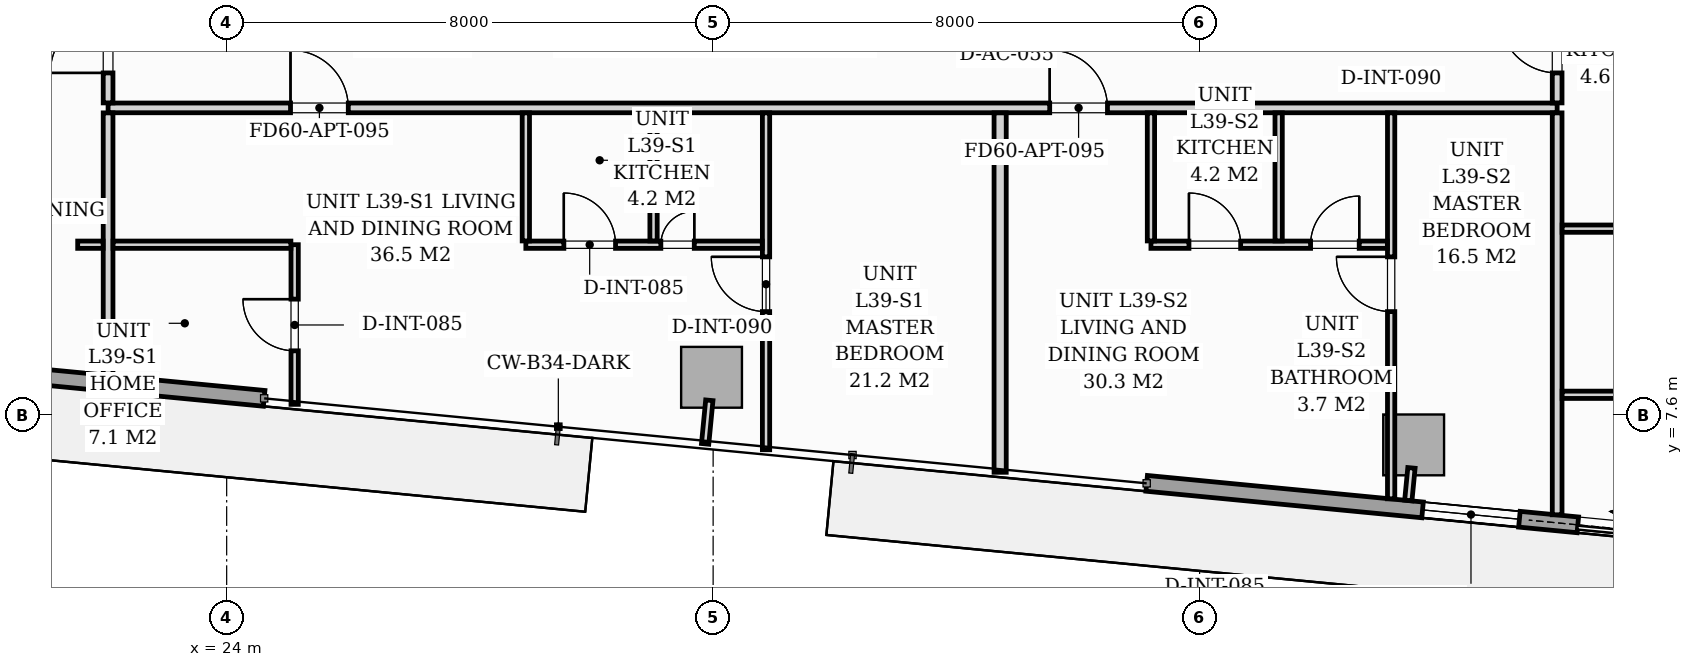
"""IFC4 building model, lengths in metres.
Left out: names, types, materials, properties, quantities, classifications, styles, units other than length and angle.
Written with IfcOpenShell. Run it as: python <this file> out.ifc"""

import sys

from ifc_helpers import new_model, si_unit, direction, frame, frame_2d, origin, origin_2d, place, context, subcontext, project, spatial, rectangle, extrude, source, transform, mapped, element, fill, save


model = new_model("IFC4")
c1 = context("Model", 3, precision=1e-05, world=origin(), true_north=direction((0.0, 1.0)))
c2 = subcontext(c1, "Body", "Model", "MODEL_VIEW")
j1 = project(units=[si_unit("LENGTHUNIT", "METRE"), si_unit("PLANEANGLEUNIT", "RADIAN")], contexts=[c1])
p1 = place(None, origin())
s1 = spatial("IfcSite", under=j1, at=p1, CompositionType="ELEMENT")
p2 = place(p1, origin())
s2 = spatial("IfcBuilding", under=s1, at=p2, CompositionType="ELEMENT")
p3 = place(p2, frame((0.0, 0.0, 137.4)))
s3 = spatial("IfcBuildingStorey", under=s2, at=p3, CompositionType="ELEMENT", Elevation=137.4)
m1 = source(origin(), c2, "Body", "SweptSolid", [
    extrude(rectangle(XDim=1.0, YDim=1.0, at=origin_2d()), origin(), (0.0, 0.0, 1.0), 3.196),
])
for number, where, z_axis, x_axis in (
    (1, (31.974, 8.22, 0.002), (0.0, 0.0, 1.0), (0.995, -0.096, 0.0)),
    (2, (43.521, 7.108, 0.002), (0.0, 0.0, 1.0), (0.995, -0.096, 0.0)),
):
    element("IfcColumn", number, at=place(p3, frame(where, z_axis=z_axis, x_axis=x_axis)), inside=s3, PredefinedType="COLUMN", context=c2, shape_type="MappedRepresentation", body=[
        mapped(m1, transform((0.0, 0.0, 0.0), scale=1.0)),
    ])
p4 = place(p3, frame((56.061, 4.845, 0.0), z_axis=(0.0, 0.0, 1.0), x_axis=(-0.995395976631, 0.095848055311, 0.0)))
e3 = element("IfcWall", 3, at=p4, inside=s3, PredefinedType="STANDARD", context=c2, shape_type="SweptSolid", body=[
    extrude(rectangle(XDim=17.01, YDim=0.26, at=frame_2d((8.505, 0.0))), origin(), (0.0, 0.0, 1.0), 2.94),
])
p5 = place(p4, frame((8.087, 0.0, 0.0)))
e4 = element("IfcOpeningElement", 4, at=p5, cuts=e3, PredefinedType="OPENING", context=c2, shape_type="SweptSolid", body=[
    extrude(rectangle(XDim=1.8, YDim=2.06, at=frame_2d((0.9, 1.03))), frame((0.0, 0.14, 0.0), z_axis=(0.0, -1.0, 0.0), x_axis=(1.0, 0.0, 0.0)), (0.0, 0.0, 1.0), 0.28),
])
p6 = place(p4, frame((2.05, 0.0, 0.65)))
e5 = element("IfcOpeningElement", 5, at=p6, cuts=e3, PredefinedType="OPENING", context=c2, shape_type="SweptSolid", body=[
    extrude(rectangle(XDim=1.6, YDim=1.5, at=frame_2d((0.8, 0.75))), frame((0.0, 0.14, 0.0), z_axis=(0.0, -1.0, 0.0), x_axis=(1.0, 0.0, 0.0)), (0.0, 0.0, 1.0), 0.28),
])
p7 = place(p4, frame((10.852, 0.0, 0.75)))
e6 = element("IfcOpeningElement", 6, at=p7, cuts=e3, PredefinedType="OPENING", context=c2, shape_type="SweptSolid", body=[
    extrude(rectangle(XDim=1.6, YDim=1.5, at=frame_2d((0.8, 0.75))), frame((0.0, 0.14, 0.0), z_axis=(0.0, -1.0, 0.0), x_axis=(1.0, 0.0, 0.0)), (0.0, 0.0, 1.0), 0.28),
])
p8 = place(p3, frame((24.617, 7.873, 0.0), z_axis=(0.0, 0.0, 1.0), x_axis=(-0.995395976631, 0.095848055311, 0.0)))
e7 = element("IfcWall", 7, at=p8, inside=s3, PredefinedType="STANDARD", context=c2, shape_type="SweptSolid", body=[
    extrude(rectangle(XDim=17.01, YDim=0.26, at=frame_2d((8.505, 0.0))), origin(), (0.0, 0.0, 1.0), 2.94),
])
p9 = place(p8, frame((7.35, 0.0, 0.0)))
e8 = element("IfcOpeningElement", 8, at=p9, cuts=e7, PredefinedType="OPENING", context=c2, shape_type="SweptSolid", body=[
    extrude(rectangle(XDim=1.8, YDim=2.06, at=frame_2d((0.9, 1.03))), frame((0.0, 0.14, 0.0), z_axis=(0.0, -1.0, 0.0), x_axis=(1.0, 0.0, 0.0)), (0.0, 0.0, 1.0), 0.28),
])
p10 = place(p8, frame((9.7, 0.0, 0.65)))
e9 = element("IfcOpeningElement", 9, at=p10, cuts=e7, PredefinedType="OPENING", context=c2, shape_type="SweptSolid", body=[
    extrude(rectangle(XDim=1.6, YDim=1.5, at=frame_2d((0.8, 0.75))), frame((0.0, 0.14, 0.0), z_axis=(0.0, -1.0, 0.0), x_axis=(1.0, 0.0, 0.0)), (0.0, 0.0, 1.0), 0.28),
])
p11 = place(p3, frame((22.05, 12.65, 0.0), z_axis=(0.0, 0.0, 1.0), x_axis=(1.0, 0.0, 0.0)))
e10 = element("IfcWall", 10, at=p11, inside=s3, PredefinedType="PARTITIONING", context=c2, shape_type="SweptSolid", body=[
    extrude(rectangle(XDim=23.83, YDim=0.16, at=frame_2d((11.915, 0.0))), origin(), (0.0, 0.0, 1.0), 2.94),
])
p12 = place(p11, frame((3.0, 0.0, 0.0)))
e11 = element("IfcOpeningElement", 11, at=p12, cuts=e10, PredefinedType="OPENING", context=c2, shape_type="SweptSolid", body=[
    extrude(rectangle(XDim=0.95, YDim=2.06, at=frame_2d((0.475, 1.03))), frame((0.0, 0.09, 0.0), z_axis=(0.0, -1.0, 0.0), x_axis=(1.0, 0.0, 0.0)), (0.0, 0.0, 1.0), 0.18),
])
p13 = place(p11, frame((15.485, 0.0, 0.0)))
e12 = element("IfcOpeningElement", 12, at=p13, cuts=e10, PredefinedType="OPENING", context=c2, shape_type="SweptSolid", body=[
    extrude(rectangle(XDim=0.95, YDim=2.06, at=frame_2d((0.475, 1.03))), frame((0.0, 0.09, 0.0), z_axis=(0.0, -1.0, 0.0), x_axis=(1.0, 0.0, 0.0)), (0.0, 0.0, 1.0), 0.18),
])
p14 = place(p3, frame((22.05, 8.253, 0.0), z_axis=(0.0, 0.0, 1.0), x_axis=(0.0, 1.0, 0.0)))
e13 = element("IfcWall", 13, at=p14, inside=s3, PredefinedType="PARTITIONING", context=c2, shape_type="SweptSolid", body=[
    extrude(rectangle(XDim=4.315, YDim=0.16, at=frame_2d((2.157, 0.0))), origin(), (0.0, 0.0, 1.0), 2.94),
])
p15 = place(p3, frame((22.05, 12.732, 0.0), z_axis=(0.0, 0.0, 1.0), x_axis=(0.0, 1.0, 0.0)))
e14 = element("IfcWall", 14, at=p15, inside=s3, PredefinedType="PARTITIONING", context=c2, shape_type="SweptSolid", body=[
    extrude(rectangle(XDim=14.685, YDim=0.16, at=frame_2d((7.343, 0.0))), origin(), (0.0, 0.0, 1.0), 2.94),
])
p16 = place(p15, frame((0.493, 0.0, 0.0)))
e15 = element("IfcOpeningElement", 15, at=p16, cuts=e14, PredefinedType="OPENING", context=c2, shape_type="SweptSolid", body=[
    extrude(rectangle(XDim=0.95, YDim=2.06, at=frame_2d((0.475, 1.03))), frame((0.0, 0.09, 0.0), z_axis=(0.0, -1.0, 0.0), x_axis=(1.0, 0.0, 0.0)), (0.0, 0.0, 1.0), 0.18),
])
p17 = place(p15, frame((5.313, 0.0, 0.0)))
e16 = element("IfcOpeningElement", 16, at=p17, cuts=e14, PredefinedType="OPENING", context=c2, shape_type="SweptSolid", body=[
    extrude(rectangle(XDim=0.85, YDim=2.0, at=frame_2d((0.425, 1.0))), frame((0.0, 0.09, 0.0), z_axis=(0.0, -1.0, 0.0), x_axis=(1.0, 0.0, 0.0)), (0.0, 0.0, 1.0), 0.18),
])
p18 = place(p3, frame((45.88, 5.958, 0.0), z_axis=(0.0, 0.0, 1.0), x_axis=(0.0, 1.0, 0.0)))
e17 = element("IfcWall", 17, at=p18, inside=s3, PredefinedType="PARTITIONING", context=c2, shape_type="SweptSolid", body=[
    extrude(rectangle(XDim=6.61, YDim=0.16, at=frame_2d((3.305, 0.0))), origin(), (0.0, 0.0, 1.0), 2.94),
])
p19 = place(p3, frame((45.88, 12.732, 0.0), z_axis=(0.0, 0.0, 1.0), x_axis=(0.0, 1.0, 0.0)))
e18 = element("IfcWall", 18, at=p19, inside=s3, PredefinedType="PARTITIONING", context=c2, shape_type="SweptSolid", body=[
    extrude(rectangle(XDim=4.366, YDim=0.16, at=frame_2d((2.183, 0.0))), origin(), (0.0, 0.0, 1.0), 2.94),
])
p20 = place(p19, frame((0.493, 0.0, 0.0)))
e19 = element("IfcOpeningElement", 19, at=p20, cuts=e18, PredefinedType="OPENING", context=c2, shape_type="SweptSolid", body=[
    extrude(rectangle(XDim=0.95, YDim=2.06, at=frame_2d((0.475, 1.03))), frame((0.0, 0.09, 0.0), z_axis=(0.0, -1.0, 0.0), x_axis=(1.0, 0.0, 0.0)), (0.0, 0.0, 1.0), 0.18),
])
p21 = place(p3, frame((32.87, 7.028, 0.0), z_axis=(0.0, 0.0, 1.0), x_axis=(0.0, 1.0, 0.0)))
e20 = element("IfcWall", 20, at=p21, inside=s3, PredefinedType="PARTITIONING", context=c2, shape_type="SweptSolid", body=[
    extrude(rectangle(XDim=5.54, YDim=0.12, at=frame_2d((2.77, 0.0))), origin(), (0.0, 0.0, 1.0), 2.94),
])
p22 = place(p21, frame((2.272, 0.0, 0.0)))
e21 = element("IfcOpeningElement", 21, at=p22, cuts=e20, PredefinedType="OPENING", context=c2, shape_type="SweptSolid", body=[
    extrude(rectangle(XDim=0.9, YDim=2.05, at=frame_2d((0.45, 1.025))), frame((0.0, 0.07, 0.0), z_axis=(0.0, -1.0, 0.0), x_axis=(1.0, 0.0, 0.0)), (0.0, 0.0, 1.0), 0.14),
])
p23 = place(p3, frame((28.92, 10.4, 0.0), z_axis=(0.0, 0.0, 1.0), x_axis=(1.0, 0.0, 0.0)))
e22 = element("IfcWall", 22, at=p23, inside=s3, PredefinedType="PARTITIONING", context=c2, shape_type="SweptSolid", body=[
    extrude(rectangle(XDim=3.888, YDim=0.12, at=frame_2d((1.944, 0.0))), origin(), (0.0, 0.0, 1.0), 2.94),
])
p24 = place(p23, frame((0.625, 0.0, 0.0)))
e23 = element("IfcOpeningElement", 23, at=p24, cuts=e22, PredefinedType="OPENING", context=c2, shape_type="SweptSolid", body=[
    extrude(rectangle(XDim=0.85, YDim=2.05, at=frame_2d((0.425, 1.025))), frame((0.0, 0.07, 0.0), z_axis=(0.0, -1.0, 0.0), x_axis=(1.0, 0.0, 0.0)), (0.0, 0.0, 1.0), 0.14),
])
p25 = place(p23, frame((2.22, 0.0, 0.0)))
e24 = element("IfcOpeningElement", 24, at=p25, cuts=e22, PredefinedType="OPENING", context=c2, shape_type="SweptSolid", body=[
    extrude(rectangle(XDim=0.55, YDim=2.0, at=frame_2d((0.275, 1.0))), frame((0.0, 0.07, 0.0), z_axis=(0.0, -1.0, 0.0), x_axis=(1.0, 0.0, 0.0)), (0.0, 0.0, 1.0), 0.14),
])
for number, where, z_axis, x_axis in (
    (25, (31.02, 10.462, 0.0), (0.0, 0.0, 1.0), (0.0, 1.0, 0.0)),
    (26, (28.92, 10.462, 0.0), (0.0, 0.0, 1.0), (0.0, 1.0, 0.0)),
):
    element("IfcWall", number, at=place(p3, frame(where, z_axis=z_axis, x_axis=x_axis)), inside=s3, PredefinedType="PARTITIONING", context=c2, shape_type="SweptSolid", body=[
        extrude(rectangle(XDim=2.106, YDim=0.12, at=frame_2d((1.053, 0.0))), origin(), (0.0, 0.0, 1.0), 2.94),
    ])
p26 = place(p3, frame((25.118, 7.775, 0.0), z_axis=(0.0, 0.0, 1.0), x_axis=(0.0, 1.0, 0.0)))
e27 = element("IfcWall", 27, at=p26, inside=s3, PredefinedType="PARTITIONING", context=c2, shape_type="SweptSolid", body=[
    extrude(rectangle(XDim=2.625, YDim=0.12, at=frame_2d((1.312, 0.0))), origin(), (0.0, 0.0, 1.0), 2.94),
])
p27 = place(p26, frame((0.88, 0.0, 0.0)))
e28 = element("IfcOpeningElement", 28, at=p27, cuts=e27, PredefinedType="OPENING", context=c2, shape_type="SweptSolid", body=[
    extrude(rectangle(XDim=0.85, YDim=2.05, at=frame_2d((0.425, 1.025))), frame((0.0, 0.07, 0.0), z_axis=(0.0, -1.0, 0.0), x_axis=(1.0, 0.0, 0.0)), (0.0, 0.0, 1.0), 0.14),
])
p28 = place(p3, frame((21.55, 10.4, 0.0), z_axis=(0.0, 0.0, 1.0), x_axis=(1.0, 0.0, 0.0)))
e29 = element("IfcWall", 29, at=p28, inside=s3, PredefinedType="PARTITIONING", context=c2, shape_type="SweptSolid", body=[
    extrude(rectangle(XDim=0.418, YDim=0.12, at=frame_2d((0.209, 0.0))), origin(), (0.0, 0.0, 1.0), 2.94),
])
p29 = place(p3, frame((22.132, 10.4, 0.0), z_axis=(0.0, 0.0, 1.0), x_axis=(1.0, 0.0, 0.0)))
e30 = element("IfcWall", 30, at=p29, inside=s3, PredefinedType="PARTITIONING", context=c2, shape_type="SweptSolid", body=[
    extrude(rectangle(XDim=2.924, YDim=0.12, at=frame_2d((1.462, 0.0))), origin(), (0.0, 0.0, 1.0), 2.94),
])
p30 = place(p3, frame((36.72, 6.658, 0.0), z_axis=(0.0, 0.0, 1.0), x_axis=(0.0, 1.0, 0.0)))
e31 = element("IfcWall", 31, at=p30, inside=s3, PredefinedType="PARTITIONING", context=c2, shape_type="SweptSolid", body=[
    extrude(rectangle(XDim=5.91, YDim=0.2, at=frame_2d((2.955, 0.0))), origin(), (0.0, 0.0, 1.0), 2.94),
])
p31 = place(p3, frame((43.15, 6.221, 0.0), z_axis=(0.0, 0.0, 1.0), x_axis=(0.0, 1.0, 0.0)))
e32 = element("IfcWall", 32, at=p31, inside=s3, PredefinedType="PARTITIONING", context=c2, shape_type="SweptSolid", body=[
    extrude(rectangle(XDim=6.347, YDim=0.12, at=frame_2d((3.173, 0.0))), origin(), (0.0, 0.0, 1.0), 2.94),
])
p32 = place(p31, frame((3.079, 0.0, 0.0)))
e33 = element("IfcOpeningElement", 33, at=p32, cuts=e32, PredefinedType="OPENING", context=c2, shape_type="SweptSolid", body=[
    extrude(rectangle(XDim=0.9, YDim=2.05, at=frame_2d((0.45, 1.025))), frame((0.0, 0.07, 0.0), z_axis=(0.0, -1.0, 0.0), x_axis=(1.0, 0.0, 0.0)), (0.0, 0.0, 1.0), 0.14),
])
p33 = place(p3, frame((39.2, 10.4, 0.0), z_axis=(0.0, 0.0, 1.0), x_axis=(1.0, 0.0, 0.0)))
e34 = element("IfcWall", 34, at=p33, inside=s3, PredefinedType="PARTITIONING", context=c2, shape_type="SweptSolid", body=[
    extrude(rectangle(XDim=3.888, YDim=0.12, at=frame_2d((1.944, 0.0))), origin(), (0.0, 0.0, 1.0), 2.94),
])
p34 = place(p33, frame((0.625, 0.0, 0.0)))
e35 = element("IfcOpeningElement", 35, at=p34, cuts=e34, PredefinedType="OPENING", context=c2, shape_type="SweptSolid", body=[
    extrude(rectangle(XDim=0.85, YDim=2.05, at=frame_2d((0.425, 1.025))), frame((0.0, 0.07, 0.0), z_axis=(0.0, -1.0, 0.0), x_axis=(1.0, 0.0, 0.0)), (0.0, 0.0, 1.0), 0.14),
])
p35 = place(p33, frame((2.625, 0.0, 0.0)))
e36 = element("IfcOpeningElement", 36, at=p35, cuts=e34, PredefinedType="OPENING", context=c2, shape_type="SweptSolid", body=[
    extrude(rectangle(XDim=0.8, YDim=2.02, at=frame_2d((0.4, 1.01))), frame((0.0, 0.07, 0.0), z_axis=(0.0, -1.0, 0.0), x_axis=(1.0, 0.0, 0.0)), (0.0, 0.0, 1.0), 0.14),
])
for number, where, z_axis, x_axis in (
    (37, (41.3, 10.462, 0.0), (0.0, 0.0, 1.0), (0.0, 1.0, 0.0)),
    (38, (39.2, 10.462, 0.0), (0.0, 0.0, 1.0), (0.0, 1.0, 0.0)),
):
    element("IfcWall", number, at=place(p3, frame(where, z_axis=z_axis, x_axis=x_axis)), inside=s3, PredefinedType="PARTITIONING", context=c2, shape_type="SweptSolid", body=[
        extrude(rectangle(XDim=2.106, YDim=0.12, at=frame_2d((1.053, 0.0))), origin(), (0.0, 0.0, 1.0), 2.94),
    ])
p36 = place(p3, frame((10.151, 11.016, 0.0), z_axis=(0.0, 0.0, 1.0), x_axis=(1.0, 0.0, 0.0)))
e39 = element("IfcWall", 39, at=p36, inside=s3, PredefinedType="PARTITIONING", context=c2, shape_type="SweptSolid", body=[
    extrude(rectangle(XDim=11.817, YDim=0.12, at=frame_2d((5.909, 0.0))), origin(), (0.0, 0.0, 1.0), 2.94),
])
p37 = place(p36, frame((5.483, 0.0, 0.0)))
e40 = element("IfcOpeningElement", 40, at=p37, cuts=e39, PredefinedType="OPENING", context=c2, shape_type="SweptSolid", body=[
    extrude(rectangle(XDim=0.85, YDim=2.05, at=frame_2d((0.425, 1.025))), frame((0.0, 0.07, 0.0), z_axis=(0.0, -1.0, 0.0), x_axis=(1.0, 0.0, 0.0)), (0.0, 0.0, 1.0), 0.14),
])
p38 = place(p3, frame((45.962, 7.932, 0.0), z_axis=(0.0, 0.0, 1.0), x_axis=(1.0, 0.0, 0.0)))
e41 = element("IfcWall", 41, at=p38, inside=s3, PredefinedType="PARTITIONING", context=c2, shape_type="SweptSolid", body=[
    extrude(rectangle(XDim=12.828, YDim=0.12, at=frame_2d((6.414, 0.0))), origin(), (0.0, 0.0, 1.0), 2.94),
])
p39 = place(p38, frame((5.995, 0.0, 0.0)))
e42 = element("IfcOpeningElement", 42, at=p39, cuts=e41, PredefinedType="OPENING", context=c2, shape_type="SweptSolid", body=[
    extrude(rectangle(XDim=0.85, YDim=2.05, at=frame_2d((0.425, 1.025))), frame((0.0, 0.07, 0.0), z_axis=(0.0, -1.0, 0.0), x_axis=(1.0, 0.0, 0.0)), (0.0, 0.0, 1.0), 0.14),
])
p40 = place(p3, frame((45.962, 10.664, 0.0), z_axis=(0.0, 0.0, 1.0), x_axis=(1.0, 0.0, 0.0)))
e43 = element("IfcWall", 43, at=p40, inside=s3, PredefinedType="PARTITIONING", context=c2, shape_type="SweptSolid", body=[
    extrude(rectangle(XDim=13.091, YDim=0.12, at=frame_2d((6.545, 0.0))), origin(), (0.0, 0.0, 1.0), 2.94),
])
p41 = place(p40, frame((6.127, 0.0, 0.0)))
e44 = element("IfcOpeningElement", 44, at=p41, cuts=e43, PredefinedType="OPENING", context=c2, shape_type="SweptSolid", body=[
    extrude(rectangle(XDim=0.85, YDim=2.05, at=frame_2d((0.425, 1.025))), frame((0.0, 0.07, 0.0), z_axis=(0.0, -1.0, 0.0), x_axis=(1.0, 0.0, 0.0)), (0.0, 0.0, 1.0), 0.14),
])
p42 = place(p3, frame((31.938, 7.841, 0.0), z_axis=(0.0, 0.0, 1.0), x_axis=(-0.095977354523, -0.995383517755, 0.0)))
e45 = element("IfcWall", 45, at=p42, inside=s3, PredefinedType="PARTITIONING", context=c2, shape_type="SweptSolid", body=[
    extrude(rectangle(XDim=0.72, YDim=0.12, at=frame_2d((0.36, 0.0))), origin(), (0.0, 0.0, 1.0), 2.94),
])
p43 = place(p3, frame((43.484, 6.729, 0.0), z_axis=(0.0, 0.0, 1.0), x_axis=(-0.095772948675, -0.995403205893, 0.0)))
e46 = element("IfcWall", 46, at=p43, inside=s3, PredefinedType="PARTITIONING", context=c2, shape_type="SweptSolid", body=[
    extrude(rectangle(XDim=0.538, YDim=0.12, at=frame_2d((0.269, 0.0))), origin(), (0.0, 0.0, 1.0), 2.94),
])
m2 = source(origin(), c2, "Body", "SweptSolid", [
    extrude(rectangle(XDim=1.8, YDim=2.06, at=frame_2d((0.9, 1.03))), frame((0.0, 0.025, 0.0), z_axis=(0.0, -1.0, 0.0), x_axis=(1.0, 0.0, 0.0)), (0.0, 0.0, 1.0), 0.05),
])
p44 = place(p5, origin())
e47 = element("IfcDoor", 47, at=p44, inside=s3, OperationType="SLIDING_TO_RIGHT", PredefinedType="DOOR", context=c2, shape_type="MappedRepresentation", body=[
    mapped(m2, transform((0.0, 0.0, 0.0), scale=1.0)),
])
fill(e4, e47)
m3 = source(origin(), c2, "Body", "SweptSolid", [
    extrude(rectangle(XDim=1.6, YDim=1.5, at=frame_2d((0.8, 0.75))), frame((0.0, 0.03, 0.0), z_axis=(0.0, -1.0, 0.0), x_axis=(1.0, 0.0, 0.0)), (0.0, 0.0, 1.0), 0.06),
])
p45 = place(p7, origin())
e48 = element("IfcWindow", 48, at=p45, inside=s3, PartitioningType="SINGLE_PANEL", PredefinedType="WINDOW", context=c2, shape_type="MappedRepresentation", body=[
    mapped(m3, transform((0.0, 0.0, 0.0), scale=1.0)),
])
fill(e6, e48)
m4 = source(origin(), c2, "Body", "SweptSolid", [
    extrude(rectangle(XDim=0.85, YDim=2.05, at=frame_2d((0.425, 1.025))), frame((0.0, 0.025, 0.0), z_axis=(0.0, -1.0, 0.0), x_axis=(1.0, 0.0, 0.0)), (0.0, 0.0, 1.0), 0.05),
])
p46 = place(p27, origin())
e49 = element("IfcDoor", 49, at=p46, inside=s3, OperationType="SINGLE_SWING_RIGHT", PredefinedType="DOOR", context=c2, shape_type="MappedRepresentation", body=[
    mapped(m4, transform((0.0, 0.0, 0.0), scale=1.0)),
])
fill(e28, e49)
m5 = source(origin(), c2, "Body", "SweptSolid", [
    extrude(rectangle(XDim=0.95, YDim=2.06, at=frame_2d((0.475, 1.03))), frame((0.0, 0.025, 0.0), z_axis=(0.0, -1.0, 0.0), x_axis=(1.0, 0.0, 0.0)), (0.0, 0.0, 1.0), 0.05),
])
p47 = place(p12, origin())
e50 = element("IfcDoor", 50, at=p47, inside=s3, OperationType="SINGLE_SWING_LEFT", PredefinedType="DOOR", context=c2, shape_type="MappedRepresentation", body=[
    mapped(m5, transform((0.0, 0.0, 0.0), scale=1.0)),
])
fill(e11, e50)
m6 = source(origin(), c2, "Body", "SweptSolid", [
    extrude(rectangle(XDim=0.9, YDim=2.05, at=frame_2d((0.45, 1.025))), frame((0.0, 0.025, 0.0), z_axis=(0.0, -1.0, 0.0), x_axis=(1.0, 0.0, 0.0)), (0.0, 0.0, 1.0), 0.05),
])
p48 = place(p22, origin())
e51 = element("IfcDoor", 51, at=p48, inside=s3, OperationType="SINGLE_SWING_RIGHT", PredefinedType="DOOR", context=c2, shape_type="MappedRepresentation", body=[
    mapped(m6, transform((0.0, 0.0, 0.0), scale=1.0)),
])
fill(e21, e51)
p49 = place(p24, origin())
e52 = element("IfcDoor", 52, at=p49, inside=s3, OperationType="SINGLE_SWING_LEFT", PredefinedType="DOOR", context=c2, shape_type="MappedRepresentation", body=[
    mapped(m4, transform((0.0, 0.0, 0.0), scale=1.0)),
])
fill(e23, e52)
m7 = source(origin(), c2, "Body", "SweptSolid", [
    extrude(rectangle(XDim=0.55, YDim=2.0, at=frame_2d((0.275, 1.0))), frame((0.0, 0.025, 0.0), z_axis=(0.0, -1.0, 0.0), x_axis=(1.0, 0.0, 0.0)), (0.0, 0.0, 1.0), 0.05),
])
p50 = place(p25, origin())
e53 = element("IfcDoor", 53, at=p50, inside=s3, OperationType="SINGLE_SWING_RIGHT", PredefinedType="DOOR", context=c2, shape_type="MappedRepresentation", body=[
    mapped(m7, transform((0.0, 0.0, 0.0), scale=1.0)),
])
fill(e24, e53)
p51 = place(p13, origin())
e54 = element("IfcDoor", 54, at=p51, inside=s3, OperationType="SINGLE_SWING_LEFT", PredefinedType="DOOR", context=c2, shape_type="MappedRepresentation", body=[
    mapped(m5, transform((0.0, 0.0, 0.0), scale=1.0)),
])
fill(e12, e54)
p52 = place(p32, origin())
e55 = element("IfcDoor", 55, at=p52, inside=s3, OperationType="SINGLE_SWING_RIGHT", PredefinedType="DOOR", context=c2, shape_type="MappedRepresentation", body=[
    mapped(m6, transform((0.0, 0.0, 0.0), scale=1.0)),
])
fill(e33, e55)
p53 = place(p34, origin())
e56 = element("IfcDoor", 56, at=p53, inside=s3, OperationType="SINGLE_SWING_LEFT", PredefinedType="DOOR", context=c2, shape_type="MappedRepresentation", body=[
    mapped(m4, transform((0.0, 0.0, 0.0), scale=1.0)),
])
fill(e35, e56)
m8 = source(origin(), c2, "Body", "SweptSolid", [
    extrude(rectangle(XDim=0.8, YDim=2.02, at=frame_2d((0.4, 1.01))), frame((0.0, 0.025, 0.0), z_axis=(0.0, -1.0, 0.0), x_axis=(1.0, 0.0, 0.0)), (0.0, 0.0, 1.0), 0.05),
])
p54 = place(p35, origin())
e57 = element("IfcDoor", 57, at=p54, inside=s3, OperationType="SINGLE_SWING_RIGHT", PredefinedType="DOOR", context=c2, shape_type="MappedRepresentation", body=[
    mapped(m8, transform((0.0, 0.0, 0.0), scale=1.0)),
])
fill(e36, e57)
p55 = place(p16, origin())
e58 = element("IfcDoor", 58, at=p55, inside=s3, OperationType="SINGLE_SWING_LEFT", PredefinedType="DOOR", context=c2, shape_type="MappedRepresentation", body=[
    mapped(m5, transform((0.0, 0.0, 0.0), scale=1.0)),
])
fill(e15, e58)
p56 = place(p20, origin())
e59 = element("IfcDoor", 59, at=p56, inside=s3, OperationType="SINGLE_SWING_RIGHT", PredefinedType="DOOR", context=c2, shape_type="MappedRepresentation", body=[
    mapped(m5, transform((0.0, 0.0, 0.0), scale=1.0)),
])
fill(e19, e59)
save(model, sys.argv[1])
